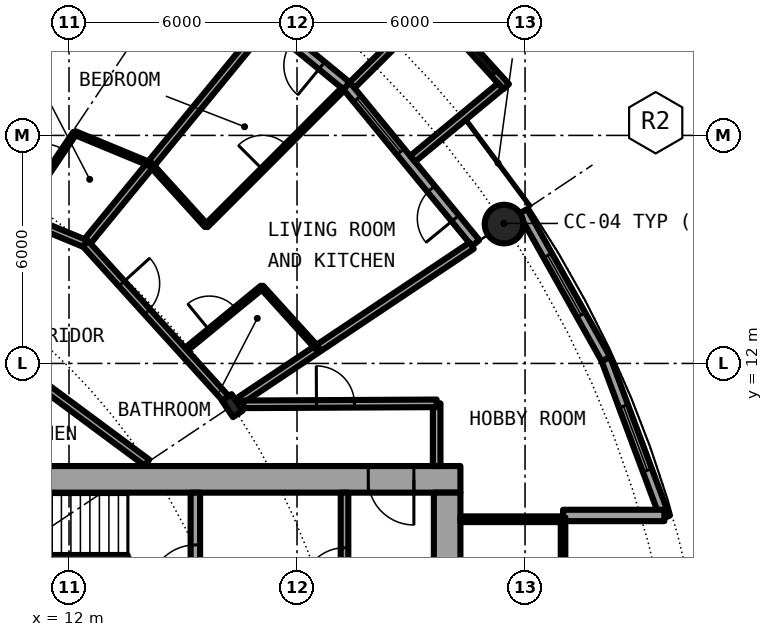
"""IFC4 building model, lengths in metres.
Left out: names, types, materials, properties, quantities, classifications, styles, units other than length and angle.
Written with IfcOpenShell. Run it as: python <this file> out.ifc"""

import sys

from ifc_helpers import new_model, si_unit, direction, frame, frame_2d, origin, origin_2d, place, context, subcontext, project, spatial, rectangle, circle, hollow_circle, i_section, extrude, element, fill, save


model = new_model("IFC4")
c1 = context("Model", 3, precision=1e-05, world=origin(), true_north=direction((0.0, 1.0)))
c2 = subcontext(c1, "Body", "Model", "MODEL_VIEW")
j1 = project(units=[si_unit("LENGTHUNIT", "METRE"), si_unit("PLANEANGLEUNIT", "RADIAN")], contexts=[c1])
p1 = place(None, origin())
s1 = spatial("IfcSite", under=j1, at=p1, CompositionType="ELEMENT")
p2 = place(p1, origin())
s2 = spatial("IfcBuilding", under=s1, at=p2, CompositionType="ELEMENT")
p3 = place(p2, frame((0.0, 0.0, 69.7)))
s3 = spatial("IfcBuildingStorey", under=s2, at=p3, CompositionType="ELEMENT", Elevation=69.7)
p4 = place(p3, frame((23.448, 15.667, 0.0), z_axis=(0.0, 0.0, 1.0), x_axis=(1.0, 0.0, 0.0)))
e1 = element("IfcColumn", 1, at=p4, inside=s3, PredefinedType="COLUMN", context=c2, shape_type="SweptSolid", body=[
    extrude(hollow_circle(Radius=0.508, WallThickness=0.04, at=origin_2d()), origin(), (0.0, 0.0, 1.0), 3.05),
])
p5 = place(p3, frame((16.297, 10.889, 0.0), z_axis=(0.0, 0.0, 1.0), x_axis=(0.831469612303, 0.55557023302, 0.0)))
e2 = element("IfcColumn", 2, at=p5, inside=s3, PredefinedType="COLUMN", context=c2, shape_type="SweptSolid", body=[
    extrude(i_section(OverallWidth=0.306, OverallDepth=0.524, WebThickness=0.021, FlangeThickness=0.04, FilletRadius=0.027, at=origin_2d()), origin(), (0.0, 0.0, 1.0), 3.05),
])
p6 = place(p3, frame((22.699, 15.167, 0.0), z_axis=(0.0, 0.0, 1.0), x_axis=(-0.634382322723, 0.773019449054, 0.0)))
e3 = element("IfcWall", 3, at=p6, inside=s3, PredefinedType="SOLIDWALL", context=c2, shape_type="SweptSolid", body=[
    extrude(rectangle(XDim=5.352, YDim=0.25, at=frame_2d((2.676, 0.0))), origin(), (0.0, 0.0, 1.0), 2.7),
])
p7 = place(p6, frame((0.841, 0.0, 0.0)))
e4 = element("IfcOpeningElement", 4, at=p7, cuts=e3, PredefinedType="OPENING", context=c2, shape_type="SweptSolid", body=[
    extrude(rectangle(XDim=1.0, YDim=2.2, at=frame_2d((0.5, 1.1))), frame((0.0, 0.135, 0.0), z_axis=(0.0, -1.0, 0.0), x_axis=(1.0, 0.0, 0.0)), (0.0, 0.0, 1.0), 0.27),
])
p8 = place(p6, frame((3.111, 0.0, 0.3)))
e5 = element("IfcOpeningElement", 5, at=p8, cuts=e3, PredefinedType="OPENING", context=c2, shape_type="SweptSolid", body=[
    extrude(rectangle(XDim=1.8, YDim=2.1, at=frame_2d((0.9, 1.05))), frame((0.0, 0.135, 0.0), z_axis=(0.0, -1.0, 0.0), x_axis=(1.0, 0.0, 0.0)), (0.0, 0.0, 1.0), 0.27),
])
p9 = place(p3, frame((23.503, 19.282, -0.03), z_axis=(0.0, 0.0, 1.0), x_axis=(-0.671506829416, 0.740998365753, 0.0)))
e6 = element("IfcWall", 6, at=p9, inside=s3, PredefinedType="SOLIDWALL", context=c2, shape_type="SweptSolid", body=[
    extrude(rectangle(XDim=2.993, YDim=0.2, at=frame_2d((1.497, 0.0))), origin(), (0.0, 0.0, 1.0), 2.73),
])
p10 = place(p9, frame((0.457, 0.0, 0.33)))
e7 = element("IfcOpeningElement", 7, at=p10, cuts=e6, PredefinedType="OPENING", context=c2, shape_type="SweptSolid", body=[
    extrude(circle(Radius=1.04, at=frame_2d((1.04, 1.04))), frame((0.0, 0.11, 0.0), z_axis=(0.0, -1.0, 0.0), x_axis=(1.0, 0.0, 0.0)), (0.0, 0.0, 1.0), 0.22),
])
p11 = place(p3, frame((21.041, 17.384, -0.03), z_axis=(0.0, 0.0, 1.0), x_axis=(0.770784861449, 0.63709551667, 0.0)))
e8 = element("IfcWall", 8, at=p11, inside=s3, PredefinedType="SOLIDWALL", context=c2, shape_type="SweptSolid", body=[
    extrude(rectangle(XDim=3.006, YDim=0.2, at=frame_2d((1.503, 0.0))), origin(), (0.0, 0.0, 1.0), 2.73),
])
p12 = place(p3, frame((19.45, 19.323, -0.03), z_axis=(0.0, 0.0, 1.0), x_axis=(0.709727076896, 0.704476739375, 0.0)))
e9 = element("IfcWall", 9, at=p12, inside=s3, PredefinedType="SOLIDWALL", context=c2, shape_type="SweptSolid", body=[
    extrude(rectangle(XDim=2.883, YDim=0.2, at=frame_2d((1.441, 0.0))), origin(), (0.0, 0.0, 1.0), 2.73),
])
p13 = place(p3, frame((19.304, 19.304, 0.0), z_axis=(0.0, 0.0, 1.0), x_axis=(-0.773019449054, 0.634382322723, 0.0)))
e10 = element("IfcWall", 10, at=p13, inside=s3, PredefinedType="SOLIDWALL", context=c2, shape_type="SweptSolid", body=[
    extrude(rectangle(XDim=5.352, YDim=0.25, at=frame_2d((2.676, 0.0))), origin(), (0.0, 0.0, 1.0), 2.7),
])
p14 = place(p13, frame((0.841, 0.0, 0.0)))
e11 = element("IfcOpeningElement", 11, at=p14, cuts=e10, PredefinedType="OPENING", context=c2, shape_type="SweptSolid", body=[
    extrude(rectangle(XDim=1.0, YDim=2.2, at=frame_2d((0.5, 1.1))), frame((0.0, 0.135, 0.0), z_axis=(0.0, -1.0, 0.0), x_axis=(1.0, 0.0, 0.0)), (0.0, 0.0, 1.0), 0.27),
])
p15 = place(p13, frame((3.111, 0.0, 0.3)))
e12 = element("IfcOpeningElement", 12, at=p15, cuts=e10, PredefinedType="OPENING", context=c2, shape_type="SweptSolid", body=[
    extrude(rectangle(XDim=1.8, YDim=2.1, at=frame_2d((0.9, 1.05))), frame((0.0, 0.135, 0.0), z_axis=(0.0, -1.0, 0.0), x_axis=(1.0, 0.0, 0.0)), (0.0, 0.0, 1.0), 0.27),
])
p16 = place(p3, frame((27.682, 7.945, 0.0), z_axis=(0.0, 0.0, 1.0), x_axis=(-0.349247811493, 0.937030397675, 0.0)))
e13 = element("IfcWall", 13, at=p16, inside=s3, PredefinedType="SOLIDWALL", context=c2, shape_type="SweptSolid", body=[
    extrude(rectangle(XDim=4.452, YDim=0.25, at=frame_2d((2.226, 0.0))), origin(), (0.0, 0.0, 1.0), 2.7),
])
p17 = place(p16, frame((1.327, 0.0, 0.3)))
e14 = element("IfcOpeningElement", 14, at=p17, cuts=e13, PredefinedType="OPENING", context=c2, shape_type="SweptSolid", body=[
    extrude(rectangle(XDim=1.8, YDim=2.1, at=frame_2d((0.9, 1.05))), frame((0.0, 0.135, 0.0), z_axis=(0.0, -1.0, 0.0), x_axis=(1.0, 0.0, 0.0)), (0.0, 0.0, 1.0), 0.27),
])
p18 = place(p3, frame((26.127, 12.117, 0.0), z_axis=(0.0, 0.0, 1.0), x_axis=(-0.489696356642, 0.871893042919, 0.0)))
e15 = element("IfcWall", 15, at=p18, inside=s3, PredefinedType="SOLIDWALL", context=c2, shape_type="SweptSolid", body=[
    extrude(rectangle(XDim=4.454, YDim=0.25, at=frame_2d((2.227, 0.0))), origin(), (0.0, 0.0, 1.0), 2.7),
])
p19 = place(p18, frame((1.327, 0.0, 0.3)))
e16 = element("IfcOpeningElement", 16, at=p19, cuts=e15, PredefinedType="OPENING", context=c2, shape_type="SweptSolid", body=[
    extrude(rectangle(XDim=1.8, YDim=2.1, at=frame_2d((0.9, 1.05))), frame((0.0, 0.135, 0.0), z_axis=(0.0, -1.0, 0.0), x_axis=(1.0, 0.0, 0.0)), (0.0, 0.0, 1.0), 0.27),
])
p20 = place(p3, frame((25.0, 8.0, 0.0), z_axis=(0.0, 0.0, 1.0), x_axis=(1.0, 0.0, 0.0)))
e17 = element("IfcWall", 17, at=p20, inside=s3, PredefinedType="SOLIDWALL", context=c2, shape_type="SweptSolid", body=[
    extrude(rectangle(XDim=2.667, YDim=0.3, at=frame_2d((1.333, 0.0))), origin(), (0.0, 0.0, 1.0), 2.7),
])
p21 = place(p3, frame((22.3, 8.95, 0.0), z_axis=(0.0, 0.0, 1.0), x_axis=(-1.0, 0.0, 0.0)))
e18 = element("IfcWall", 18, at=p21, inside=s3, PredefinedType="SHEAR", context=c2, shape_type="SweptSolid", body=[
    extrude(rectangle(XDim=14.0, YDim=0.7, at=frame_2d((7.0, 0.0))), origin(), (0.0, 0.0, 1.0), 3.05),
])
p22 = place(p21, frame((1.225, 0.0, 0.0)))
e19 = element("IfcOpeningElement", 19, at=p22, cuts=e18, PredefinedType="OPENING", context=c2, shape_type="SweptSolid", body=[
    extrude(rectangle(XDim=1.2, YDim=2.3, at=frame_2d((0.6, 1.15))), frame((0.0, 0.36, 0.0), z_axis=(0.0, -1.0, 0.0), x_axis=(1.0, 0.0, 0.0)), (0.0, 0.0, 1.0), 0.72),
])
p23 = place(p3, frame((21.95, 8.6, 0.0), z_axis=(0.0, 0.0, 1.0), x_axis=(0.0, -1.0, 0.0)))
e20 = element("IfcWall", 20, at=p23, inside=s3, PredefinedType="SHEAR", context=c2, shape_type="SweptSolid", body=[
    extrude(rectangle(XDim=17.2, YDim=0.7, at=frame_2d((8.6, 0.0))), origin(), (0.0, 0.0, 1.0), 3.05),
])
p24 = place(p23, frame((7.7, 0.0, 0.0)))
e21 = element("IfcOpeningElement", 21, at=p24, cuts=e20, PredefinedType="OPENING", context=c2, shape_type="SweptSolid", body=[
    extrude(rectangle(XDim=1.8, YDim=2.3, at=frame_2d((0.9, 1.15))), frame((0.0, 0.36, 0.0), z_axis=(0.0, -1.0, 0.0), x_axis=(1.0, 0.0, 0.0)), (0.0, 0.0, 1.0), 0.72),
])
p25 = place(p3, frame((15.325, 4.65, 0.0), z_axis=(0.0, 0.0, 1.0), x_axis=(0.0, 1.0, 0.0)))
e22 = element("IfcWall", 22, at=p25, inside=s3, PredefinedType="SHEAR", context=c2, shape_type="SweptSolid", body=[
    extrude(rectangle(XDim=3.95, YDim=0.25, at=frame_2d((1.975, 0.0))), origin(), (0.0, 0.0, 1.0), 3.05),
])
p26 = place(p25, frame((1.375, 0.0, 0.0)))
e23 = element("IfcOpeningElement", 23, at=p26, cuts=e22, PredefinedType="OPENING", context=c2, shape_type="SweptSolid", body=[
    extrude(rectangle(XDim=1.2, YDim=2.3, at=frame_2d((0.6, 1.15))), frame((0.0, 0.135, 0.0), z_axis=(0.0, -1.0, 0.0), x_axis=(1.0, 0.0, 0.0)), (0.0, 0.0, 1.0), 0.27),
])
p27 = place(p3, frame((19.25, 1.575, 0.0), z_axis=(0.0, 0.0, 1.0), x_axis=(0.0, 1.0, 0.0)))
e24 = element("IfcWall", 24, at=p27, inside=s3, PredefinedType="SOLIDWALL", context=c2, shape_type="SweptSolid", body=[
    extrude(rectangle(XDim=7.025, YDim=0.2, at=frame_2d((3.513, 0.0))), origin(), (0.0, 0.0, 1.0), 2.7),
])
p28 = place(p27, frame((4.475, 0.0, 0.0)))
e25 = element("IfcOpeningElement", 25, at=p28, cuts=e24, PredefinedType="OPENING", context=c2, shape_type="SweptSolid", body=[
    extrude(rectangle(XDim=1.1, YDim=2.3, at=frame_2d((0.55, 1.15))), frame((0.0, 0.11, 0.0), z_axis=(0.0, -1.0, 0.0), x_axis=(1.0, 0.0, 0.0)), (0.0, 0.0, 1.0), 0.22),
])
p29 = place(p3, frame((22.3, 7.9, 0.0), z_axis=(0.0, 0.0, 1.0), x_axis=(1.0, 0.0, 0.0)))
e26 = element("IfcWall", 26, at=p29, inside=s3, PredefinedType="PARTITIONING", context=c2, shape_type="SweptSolid", body=[
    extrude(rectangle(XDim=2.64, YDim=0.15, at=frame_2d((1.32, 0.0))), origin(), (0.0, 0.0, 1.0), 2.7),
])
p30 = place(p3, frame((25.0, -7.95, 0.0), z_axis=(0.0, 0.0, 1.0), x_axis=(0.0, 1.0, 0.0)))
e27 = element("IfcWall", 27, at=p30, inside=s3, PredefinedType="PARTITIONING", context=c2, shape_type="SweptSolid", body=[
    extrude(rectangle(XDim=15.9, YDim=0.12, at=frame_2d((7.95, 0.0))), origin(), (0.0, 0.0, 1.0), 2.7),
])
p31 = place(p30, frame((0.95, 0.0, 0.1)))
e28 = element("IfcOpeningElement", 28, at=p31, cuts=e27, PredefinedType="OPENING", context=c2, shape_type="SweptSolid", body=[
    extrude(rectangle(XDim=14.0, YDim=2.35, at=frame_2d((7.0, 1.175))), frame((0.0, 0.07, 0.0), z_axis=(0.0, -1.0, 0.0), x_axis=(1.0, 0.0, 0.0)), (0.0, 0.0, 1.0), 0.14),
])
p32 = place(p3, frame((21.675, 9.3, 0.0), z_axis=(0.0, 0.0, 1.0), x_axis=(0.0, 1.0, 0.0)))
e29 = element("IfcWall", 29, at=p32, inside=s3, PredefinedType="PARTITIONING", context=c2, shape_type="SweptSolid", body=[
    extrude(rectangle(XDim=1.65, YDim=0.2, at=frame_2d((0.825, 0.0))), origin(), (0.0, 0.0, 1.0), 2.7),
])
p33 = place(p3, frame((16.515, 11.034, 0.0), z_axis=(0.0, 0.0, 1.0), x_axis=(0.831382022135, 0.555701298605, 0.0)))
e30 = element("IfcWall", 30, at=p33, inside=s3, PredefinedType="PARTITIONING", context=c2, shape_type="SweptSolid", body=[
    extrude(rectangle(XDim=7.313, YDim=0.2, at=frame_2d((3.657, 0.0))), origin(), (0.0, 0.0, 1.0), 2.7),
])
p34 = place(p3, frame((11.087, 16.48, 0.0), z_axis=(0.0, 0.0, 1.0), x_axis=(0.558383137663, 0.829583191472, 0.0)))
e31 = element("IfcWall", 31, at=p34, inside=s3, PredefinedType="PARTITIONING", context=c2, shape_type="SweptSolid", body=[
    extrude(rectangle(XDim=1.909, YDim=0.1, at=frame_2d((0.955, 0.0))), origin(), (0.0, 0.0, 1.0), 2.7),
])
p35 = place(p34, frame((0.474, 0.0, 0.0)))
e32 = element("IfcOpeningElement", 32, at=p35, cuts=e31, PredefinedType="OPENING", context=c2, shape_type="SweptSolid", body=[
    extrude(rectangle(XDim=0.9, YDim=2.3, at=frame_2d((0.45, 1.15))), frame((0.0, 0.06, 0.0), z_axis=(0.0, -1.0, 0.0), x_axis=(1.0, 0.0, 0.0)), (0.0, 0.0, 1.0), 0.12),
])
p36 = place(p3, frame((12.435, 15.15, 0.0), z_axis=(0.0, 0.0, 1.0), x_axis=(0.634458323308, 0.772957072537, 0.0)))
e33 = element("IfcWall", 33, at=p36, inside=s3, PredefinedType="PARTITIONING", context=c2, shape_type="SweptSolid", body=[
    extrude(rectangle(XDim=7.576, YDim=0.2, at=frame_2d((3.788, 0.0))), origin(), (0.0, 0.0, 1.0), 2.7),
])
p37 = place(p3, frame((15.009, 12.31, 0.0), z_axis=(0.0, 0.0, 1.0), x_axis=(0.77319617123, 0.634166918717, 0.0)))
e34 = element("IfcWall", 34, at=p37, inside=s3, PredefinedType="PARTITIONING", context=c2, shape_type="SweptSolid", body=[
    extrude(rectangle(XDim=2.675, YDim=0.1, at=frame_2d((1.337, 0.0))), origin(), (0.0, 0.0, 1.0), 2.7),
])
p38 = place(p37, frame((0.887, 0.0, 0.0)))
e35 = element("IfcOpeningElement", 35, at=p38, cuts=e34, PredefinedType="OPENING", context=c2, shape_type="SweptSolid", body=[
    extrude(rectangle(XDim=0.9, YDim=2.3, at=frame_2d((0.45, 1.15))), frame((0.0, 0.06, 0.0), z_axis=(0.0, -1.0, 0.0), x_axis=(1.0, 0.0, 0.0)), (0.0, 0.0, 1.0), 0.12),
])
p39 = place(p3, frame((15.612, 15.622, 0.0), z_axis=(0.0, 0.0, 1.0), x_axis=(0.706914880313, 0.707298629994, 0.0)))
e36 = element("IfcWall", 36, at=p39, inside=s3, PredefinedType="PARTITIONING", context=c2, shape_type="SweptSolid", body=[
    extrude(rectangle(XDim=5.09, YDim=0.1, at=frame_2d((2.545, 0.0))), origin(), (0.0, 0.0, 1.0), 2.7),
])
p40 = place(p39, frame((2.095, 0.0, 0.0)))
e37 = element("IfcOpeningElement", 37, at=p40, cuts=e36, PredefinedType="OPENING", context=c2, shape_type="SweptSolid", body=[
    extrude(rectangle(XDim=0.9, YDim=2.3, at=frame_2d((0.45, 1.15))), frame((0.0, 0.06, 0.0), z_axis=(0.0, -1.0, 0.0), x_axis=(1.0, 0.0, 0.0)), (0.0, 0.0, 1.0), 0.12),
])
p41 = place(p3, frame((16.589, 10.924, 0.0), z_axis=(0.0, 0.0, 1.0), x_axis=(0.999987054722, 0.005088259783, 0.0)))
e38 = element("IfcWall", 38, at=p41, inside=s3, PredefinedType="PARTITIONING", context=c2, shape_type="SweptSolid", body=[
    extrude(rectangle(XDim=5.086, YDim=0.2, at=frame_2d((2.543, 0.0))), origin(), (0.0, 0.0, 1.0), 2.7),
])
p42 = place(p41, frame((1.923, 0.0, 0.0)))
e39 = element("IfcOpeningElement", 39, at=p42, cuts=e38, PredefinedType="OPENING", context=c2, shape_type="SweptSolid", body=[
    extrude(rectangle(XDim=1.0, YDim=2.3, at=frame_2d((0.5, 1.15))), frame((0.0, 0.11, 0.0), z_axis=(0.0, -1.0, 0.0), x_axis=(1.0, 0.0, 0.0)), (0.0, 0.0, 1.0), 0.22),
])
p43 = place(p3, frame((4.906, 16.172, 0.0), z_axis=(0.0, 0.0, 1.0), x_axis=(0.803204584823, -0.59570327758, 0.0)))
e40 = element("IfcWall", 40, at=p43, inside=s3, PredefinedType="PARTITIONING", context=c2, shape_type="SweptSolid", body=[
    extrude(rectangle(XDim=11.387, YDim=0.2, at=frame_2d((5.693, 0.0))), origin(), (0.0, 0.0, 1.0), 2.7),
])
p44 = place(p43, frame((4.38, 0.0, 0.0)))
e41 = element("IfcOpeningElement", 41, at=p44, cuts=e40, PredefinedType="OPENING", context=c2, shape_type="SweptSolid", body=[
    extrude(rectangle(XDim=1.0, YDim=2.3, at=frame_2d((0.5, 1.15))), frame((0.0, 0.11, 0.0), z_axis=(0.0, -1.0, 0.0), x_axis=(1.0, 0.0, 0.0)), (0.0, 0.0, 1.0), 0.22),
])
p45 = place(p3, frame((1.921, 19.506, 0.0), z_axis=(0.0, 0.0, 1.0), x_axis=(0.923845560554, -0.38276543763, 0.0)))
e42 = element("IfcWall", 42, at=p45, inside=s3, PredefinedType="PARTITIONING", context=c2, shape_type="SweptSolid", body=[
    extrude(rectangle(XDim=11.381, YDim=0.2, at=frame_2d((5.69, 0.0))), origin(), (0.0, 0.0, 1.0), 2.7),
])
p46 = place(p45, frame((7.087, 0.0, 0.0)))
e43 = element("IfcOpeningElement", 43, at=p46, cuts=e42, PredefinedType="OPENING", context=c2, shape_type="SweptSolid", body=[
    extrude(rectangle(XDim=1.0, YDim=2.3, at=frame_2d((0.5, 1.15))), frame((0.0, 0.11, 0.0), z_axis=(0.0, -1.0, 0.0), x_axis=(1.0, 0.0, 0.0)), (0.0, 0.0, 1.0), 0.22),
])
p47 = place(p3, frame((12.434, 15.151, 0.0), z_axis=(0.0, 0.0, 1.0), x_axis=(0.671601747072, -0.740912338492, 0.0)))
e44 = element("IfcWall", 44, at=p47, inside=s3, PredefinedType="PARTITIONING", context=c2, shape_type="SweptSolid", body=[
    extrude(rectangle(XDim=5.597, YDim=0.2, at=frame_2d((2.799, 0.0))), origin(), (0.0, 0.0, 1.0), 2.38),
])
p48 = place(p47, frame((1.417, 0.0, 0.0)))
e45 = element("IfcOpeningElement", 45, at=p48, cuts=e44, PredefinedType="OPENING", context=c2, shape_type="SweptSolid", body=[
    extrude(rectangle(XDim=1.0, YDim=2.3, at=frame_2d((0.5, 1.15))), frame((0.0, 0.11, 0.0), z_axis=(0.0, -1.0, 0.0), x_axis=(1.0, 0.0, 0.0)), (0.0, 0.0, 1.0), 0.22),
])
p49 = place(p3, frame((12.155, 18.062, 0.0), z_axis=(0.0, 0.0, 1.0), x_axis=(0.923874819588, -0.382694810171, 0.0)))
e46 = element("IfcWall", 46, at=p49, inside=s3, PredefinedType="PARTITIONING", context=c2, shape_type="SweptSolid", body=[
    extrude(rectangle(XDim=2.158, YDim=0.1, at=frame_2d((1.079, 0.0))), origin(), (0.0, 0.0, 1.0), 2.7),
])
p50 = place(p3, frame((14.147, 17.238, 0.0), z_axis=(0.0, 0.0, 1.0), x_axis=(0.671674967707, -0.740845960882, 0.0)))
e47 = element("IfcWall", 47, at=p50, inside=s3, PredefinedType="PARTITIONING", context=c2, shape_type="SweptSolid", body=[
    extrude(rectangle(XDim=2.181, YDim=0.1, at=frame_2d((1.091, 0.0))), origin(), (0.0, 0.0, 1.0), 2.7),
])
p51 = place(p3, frame((17.072, 14.011, 0.0), z_axis=(0.0, 0.0, 1.0), x_axis=(0.67169789574, -0.740825172937, 0.0)))
e48 = element("IfcWall", 48, at=p51, inside=s3, PredefinedType="PARTITIONING", context=c2, shape_type="SweptSolid", body=[
    extrude(rectangle(XDim=2.183, YDim=0.1, at=frame_2d((1.091, 0.0))), origin(), (0.0, 0.0, 1.0), 2.7),
])
p52 = place(p7, origin())
e49 = element("IfcDoor", 49, at=p52, inside=s3, OperationType="SINGLE_SWING_LEFT", PredefinedType="DOOR", context=c2, shape_type="SweptSolid", body=[
    extrude(rectangle(XDim=1.0, YDim=2.2, at=frame_2d((0.5, 1.1))), frame((0.0, 0.025, 0.0), z_axis=(0.0, -1.0, 0.0), x_axis=(1.0, 0.0, 0.0)), (0.0, 0.0, 1.0), 0.05),
])
fill(e4, e49)
p53 = place(p8, origin())
e50 = element("IfcWindow", 50, at=p53, inside=s3, PartitioningType="SINGLE_PANEL", PredefinedType="WINDOW", context=c2, shape_type="SweptSolid", body=[
    extrude(rectangle(XDim=1.8, YDim=2.1, at=frame_2d((0.9, 1.05))), frame((0.0, 0.03, 0.0), z_axis=(0.0, -1.0, 0.0), x_axis=(1.0, 0.0, 0.0)), (0.0, 0.0, 1.0), 0.06),
])
fill(e5, e50)
p54 = place(p10, origin())
e51 = element("IfcWindow", 51, at=p54, inside=s3, PartitioningType="SINGLE_PANEL", PredefinedType="WINDOW", context=c2, shape_type="SweptSolid", body=[
    extrude(circle(Radius=1.04, at=frame_2d((1.04, 1.04))), frame((0.0, 0.03, 0.0), z_axis=(0.0, -1.0, 0.0), x_axis=(1.0, 0.0, 0.0)), (0.0, 0.0, 1.0), 0.06),
])
fill(e7, e51)
p55 = place(p14, origin())
e52 = element("IfcDoor", 52, at=p55, inside=s3, OperationType="SINGLE_SWING_LEFT", PredefinedType="DOOR", context=c2, shape_type="SweptSolid", body=[
    extrude(rectangle(XDim=1.0, YDim=2.2, at=frame_2d((0.5, 1.1))), frame((0.0, 0.025, 0.0), z_axis=(0.0, -1.0, 0.0), x_axis=(1.0, 0.0, 0.0)), (0.0, 0.0, 1.0), 0.05),
])
fill(e11, e52)
p56 = place(p17, origin())
e53 = element("IfcWindow", 53, at=p56, inside=s3, PartitioningType="SINGLE_PANEL", PredefinedType="WINDOW", context=c2, shape_type="SweptSolid", body=[
    extrude(rectangle(XDim=1.8, YDim=2.1, at=frame_2d((0.9, 1.05))), frame((0.0, 0.03, 0.0), z_axis=(0.0, -1.0, 0.0), x_axis=(1.0, 0.0, 0.0)), (0.0, 0.0, 1.0), 0.06),
])
fill(e14, e53)
p57 = place(p19, origin())
e54 = element("IfcWindow", 54, at=p57, inside=s3, PartitioningType="SINGLE_PANEL", PredefinedType="WINDOW", context=c2, shape_type="SweptSolid", body=[
    extrude(rectangle(XDim=1.8, YDim=2.1, at=frame_2d((0.9, 1.05))), frame((0.0, 0.03, 0.0), z_axis=(0.0, -1.0, 0.0), x_axis=(1.0, 0.0, 0.0)), (0.0, 0.0, 1.0), 0.06),
])
fill(e16, e54)
p58 = place(p26, origin())
e55 = element("IfcDoor", 55, at=p58, inside=s3, OperationType="SINGLE_SWING_LEFT", PredefinedType="DOOR", context=c2, shape_type="SweptSolid", body=[
    extrude(rectangle(XDim=1.2, YDim=2.3, at=frame_2d((0.6, 1.15))), frame((0.0, 0.025, 0.0), z_axis=(0.0, -1.0, 0.0), x_axis=(1.0, 0.0, 0.0)), (0.0, 0.0, 1.0), 0.05),
])
fill(e23, e55)
p59 = place(p28, origin())
e56 = element("IfcDoor", 56, at=p59, inside=s3, OperationType="SINGLE_SWING_LEFT", PredefinedType="DOOR", context=c2, shape_type="SweptSolid", body=[
    extrude(rectangle(XDim=1.1, YDim=2.3, at=frame_2d((0.55, 1.15))), frame((0.0, 0.025, 0.0), z_axis=(0.0, -1.0, 0.0), x_axis=(1.0, 0.0, 0.0)), (0.0, 0.0, 1.0), 0.05),
])
fill(e25, e56)
p60 = place(p22, origin())
e57 = element("IfcDoor", 57, at=p60, inside=s3, OperationType="SINGLE_SWING_RIGHT", PredefinedType="DOOR", context=c2, shape_type="SweptSolid", body=[
    extrude(rectangle(XDim=1.2, YDim=2.3, at=frame_2d((0.6, 1.15))), frame((0.0, 0.025, 0.0), z_axis=(0.0, -1.0, 0.0), x_axis=(1.0, 0.0, 0.0)), (0.0, 0.0, 1.0), 0.05),
])
fill(e19, e57)
p61 = place(p31, origin())
e58 = element("IfcWindow", 58, at=p61, inside=s3, PartitioningType="SINGLE_PANEL", PredefinedType="WINDOW", context=c2, shape_type="SweptSolid", body=[
    extrude(rectangle(XDim=14.0, YDim=2.35, at=frame_2d((7.0, 1.175))), frame((0.0, 0.03, 0.0), z_axis=(0.0, -1.0, 0.0), x_axis=(1.0, 0.0, 0.0)), (0.0, 0.0, 1.0), 0.06),
])
fill(e28, e58)
p62 = place(p48, origin())
e59 = element("IfcDoor", 59, at=p62, inside=s3, OperationType="SINGLE_SWING_LEFT", PredefinedType="DOOR", context=c2, shape_type="SweptSolid", body=[
    extrude(rectangle(XDim=1.0, YDim=2.3, at=frame_2d((0.5, 1.15))), frame((0.0, 0.025, 0.0), z_axis=(0.0, -1.0, 0.0), x_axis=(1.0, 0.0, 0.0)), (0.0, 0.0, 1.0), 0.05),
])
fill(e45, e59)
p63 = place(p38, origin())
e60 = element("IfcDoor", 60, at=p63, inside=s3, OperationType="SINGLE_SWING_RIGHT", PredefinedType="DOOR", context=c2, shape_type="SweptSolid", body=[
    extrude(rectangle(XDim=0.9, YDim=2.3, at=frame_2d((0.45, 1.15))), frame((0.0, 0.025, 0.0), z_axis=(0.0, -1.0, 0.0), x_axis=(1.0, 0.0, 0.0)), (0.0, 0.0, 1.0), 0.05),
])
fill(e35, e60)
p64 = place(p40, origin())
e61 = element("IfcDoor", 61, at=p64, inside=s3, OperationType="SINGLE_SWING_LEFT", PredefinedType="DOOR", context=c2, shape_type="SweptSolid", body=[
    extrude(rectangle(XDim=0.9, YDim=2.3, at=frame_2d((0.45, 1.15))), frame((0.0, 0.025, 0.0), z_axis=(0.0, -1.0, 0.0), x_axis=(1.0, 0.0, 0.0)), (0.0, 0.0, 1.0), 0.05),
])
fill(e37, e61)
p65 = place(p35, origin())
e62 = element("IfcDoor", 62, at=p65, inside=s3, OperationType="SINGLE_SWING_LEFT", PredefinedType="DOOR", context=c2, shape_type="SweptSolid", body=[
    extrude(rectangle(XDim=0.9, YDim=2.3, at=frame_2d((0.45, 1.15))), frame((0.0, 0.025, 0.0), z_axis=(0.0, -1.0, 0.0), x_axis=(1.0, 0.0, 0.0)), (0.0, 0.0, 1.0), 0.05),
])
fill(e32, e62)
p66 = place(p42, origin())
e63 = element("IfcDoor", 63, at=p66, inside=s3, OperationType="SINGLE_SWING_LEFT", PredefinedType="DOOR", context=c2, shape_type="SweptSolid", body=[
    extrude(rectangle(XDim=1.0, YDim=2.3, at=frame_2d((0.5, 1.15))), frame((0.0, 0.025, 0.0), z_axis=(0.0, -1.0, 0.0), x_axis=(1.0, 0.0, 0.0)), (0.0, 0.0, 1.0), 0.05),
])
fill(e39, e63)
save(model, sys.argv[1])
